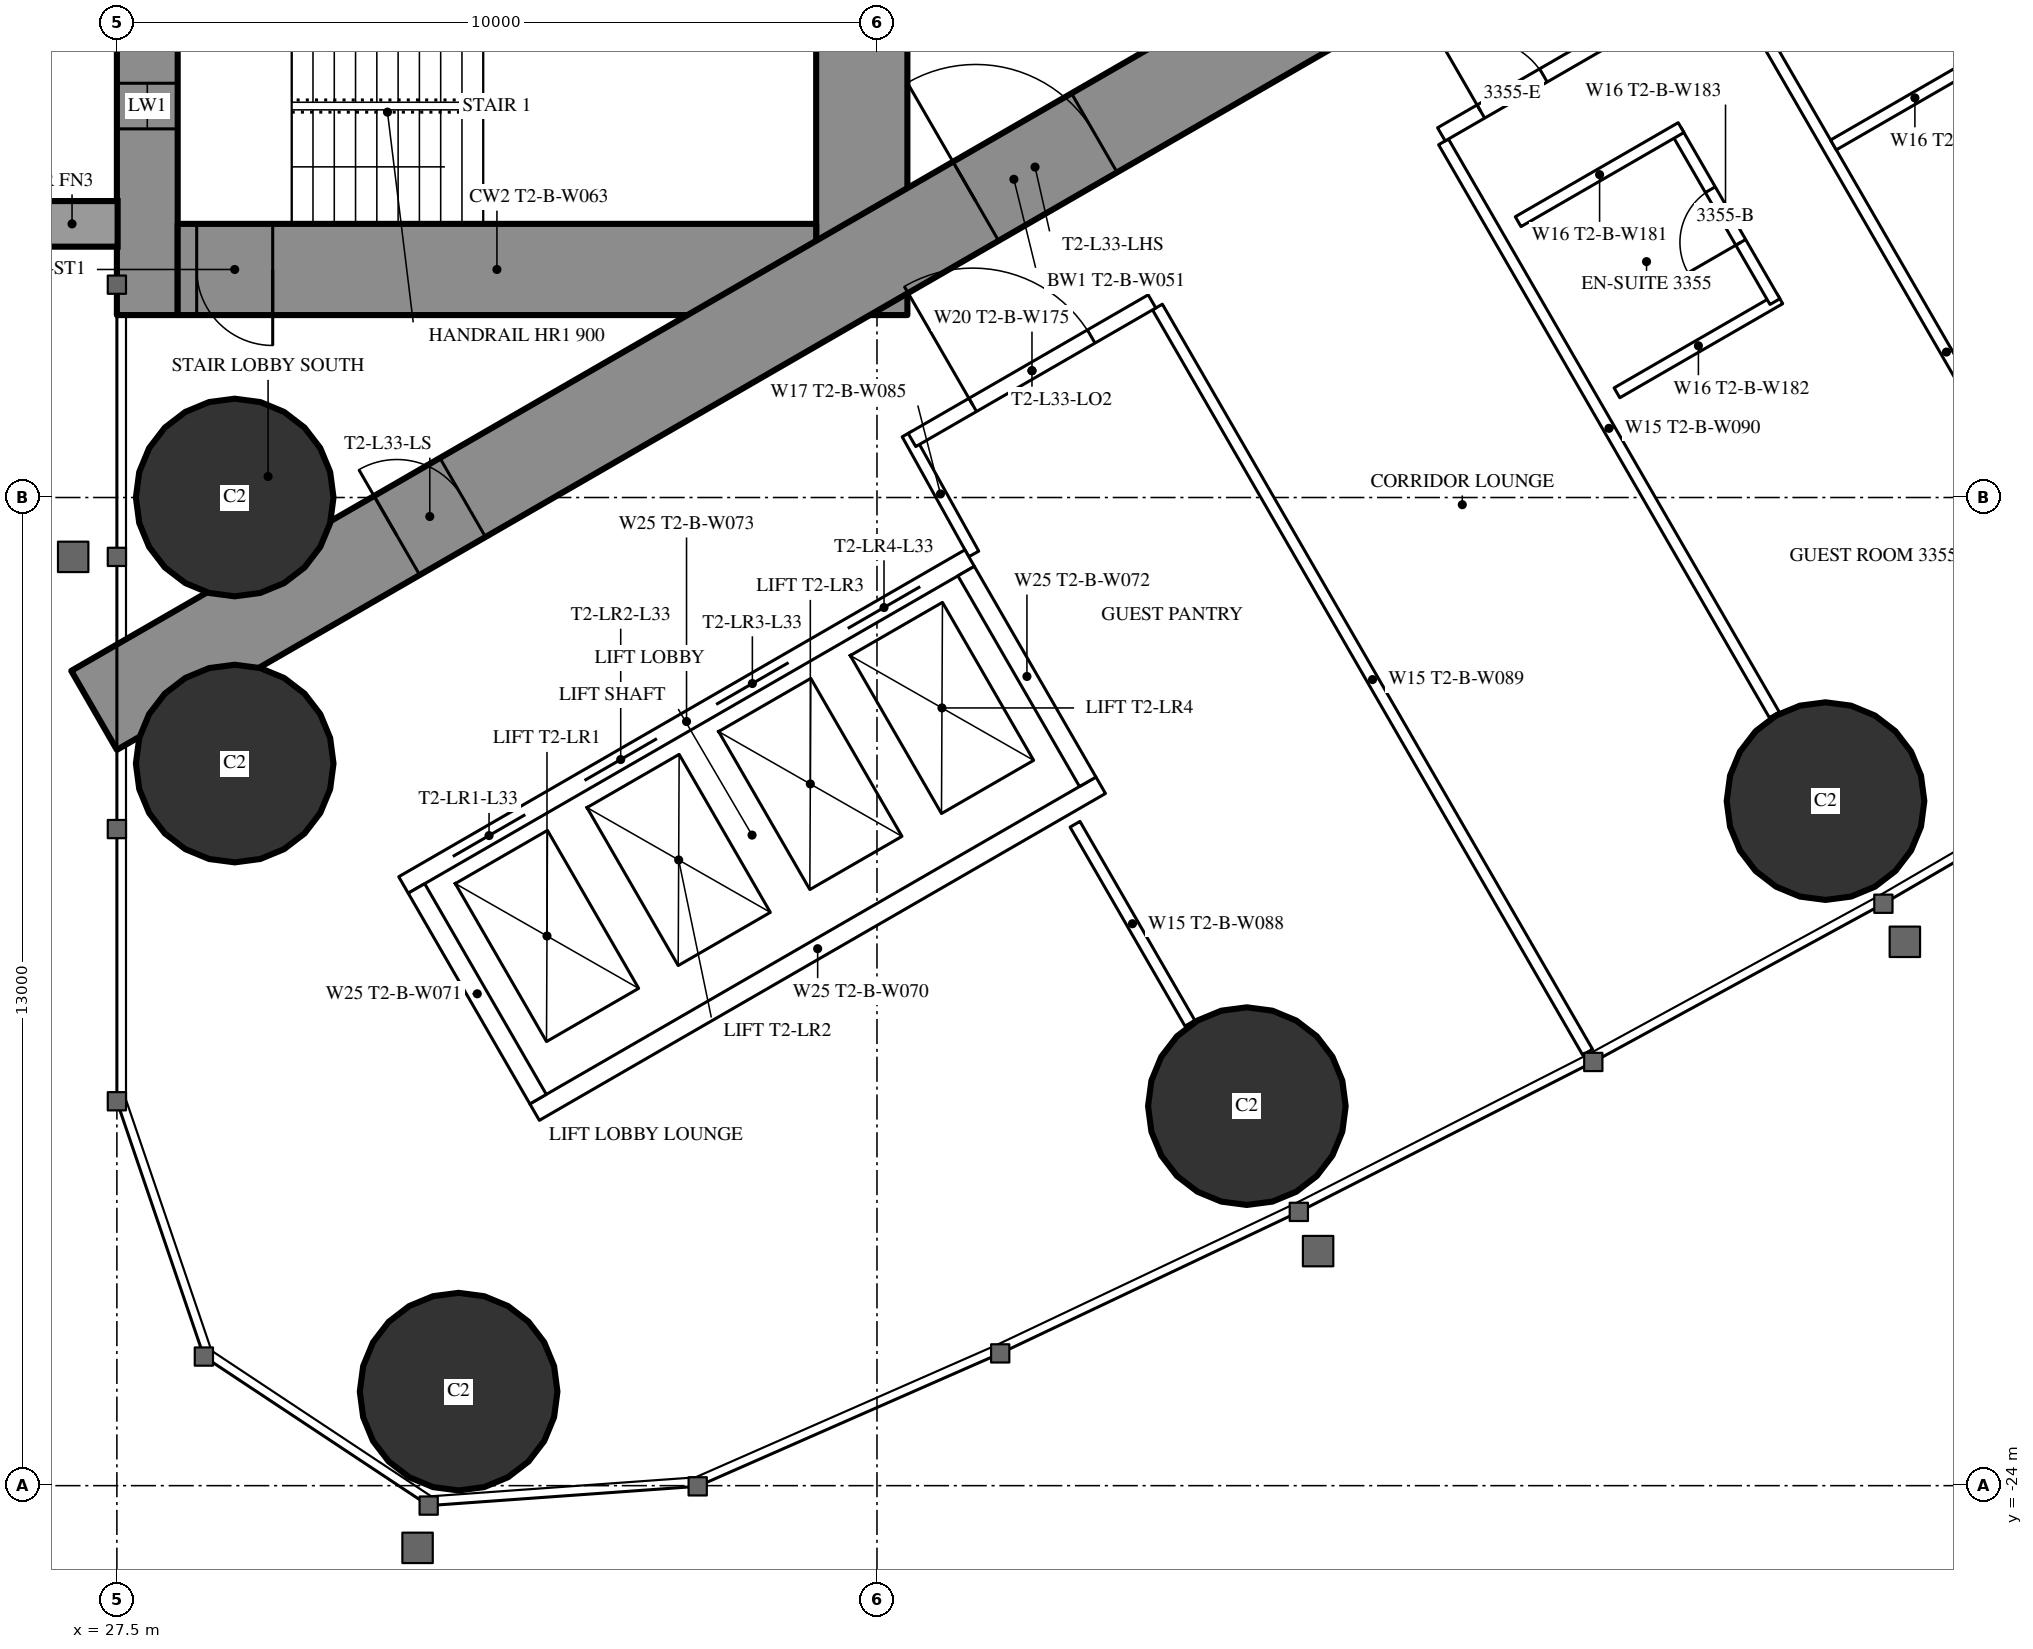
"""IFC4 building model, lengths in metres.
Left out: names, types, materials, properties, quantities, classifications, styles, units other than length and angle.
Written with IfcOpenShell. Run it as: python <this file> out.ifc"""

import sys

from ifc_helpers import new_model, si_unit, direction, frame, frame_2d, origin, origin_2d, place, context, subcontext, project, spatial, rectangle, hollow_circle, extrude, element, fill, save


model = new_model("IFC4")
c1 = context("Model", 3, precision=1e-05, world=origin(), true_north=direction((0.0, 1.0)))
c2 = subcontext(c1, "Body", "Model", "MODEL_VIEW")
j1 = project(units=[si_unit("LENGTHUNIT", "METRE"), si_unit("PLANEANGLEUNIT", "RADIAN")], contexts=[c1])
p1 = place(None, origin())
s1 = spatial("IfcSite", under=j1, at=p1, CompositionType="ELEMENT")
p2 = place(p1, origin())
s2 = spatial("IfcBuilding", under=s1, at=p2, CompositionType="ELEMENT")
p3 = place(p2, frame((0.0, 0.0, 125.6)))
s3 = spatial("IfcBuildingStorey", under=s2, at=p3, CompositionType="ELEMENT", Elevation=125.6)
for number, where, z_axis, x_axis in (
    (1, (31.996, -22.763, 0.0), (0.0, 0.0, 1.0), (1.0, 0.0, 0.0)),
    (2, (29.05, -11.0, 0.0), (0.0, 0.0, 1.0), (1.0, 0.0, 0.0)),
    (3, (29.05, -14.5, 0.0), (0.0, 0.0, 1.0), (1.0, 0.0, 0.0)),
    (4, (42.366, -19.007, 0.0), (0.0, 0.0, 1.0), (1.0, 0.0, 0.0)),
    (5, (49.979, -14.994, 0.0), (0.0, 0.0, 1.0), (1.0, 0.0, 0.0)),
):
    element("IfcColumn", number, at=place(p3, frame(where, z_axis=z_axis, x_axis=x_axis)), inside=s3, PredefinedType="COLUMN", context=c2, shape_type="SweptSolid", body=[
        extrude(hollow_circle(Radius=1.3, WallThickness=0.1, at=origin_2d()), origin(), (0.0, 0.0, 1.0), 3.5),
    ])
p4 = place(p3, frame((27.9, -8.6, 0.0), z_axis=(0.0, 0.0, 1.0), x_axis=(0.0, 1.0, 0.0)))
e6 = element("IfcWall", 6, at=p4, inside=s3, PredefinedType="SHEAR", context=c2, shape_type="SweptSolid", body=[
    extrude(rectangle(XDim=17.2, YDim=0.8, at=frame_2d((8.6, 0.0))), origin(), (0.0, 0.0, 1.0), 3.5),
])
p5 = place(p4, frame((2.45, 0.0, 0.6)))
e7 = element("IfcOpeningElement", 7, at=p5, cuts=e6, PredefinedType="OPENING", context=c2, shape_type="SweptSolid", body=[
    extrude(rectangle(XDim=0.6, YDim=2.1, at=frame_2d((0.3, 1.05))), frame((0.0, 0.41, 0.0), z_axis=(0.0, -1.0, 0.0), x_axis=(1.0, 0.0, 0.0)), (0.0, 0.0, 1.0), 0.82),
])
p6 = place(p4, frame((14.15, 0.0, 0.6)))
e8 = element("IfcOpeningElement", 8, at=p6, cuts=e6, PredefinedType="OPENING", context=c2, shape_type="SweptSolid", body=[
    extrude(rectangle(XDim=0.6, YDim=2.1, at=frame_2d((0.3, 1.05))), frame((0.0, 0.41, 0.0), z_axis=(0.0, -1.0, 0.0), x_axis=(1.0, 0.0, 0.0)), (0.0, 0.0, 1.0), 0.82),
])
p7 = place(p3, frame((37.3, -8.6, 0.0), z_axis=(0.0, 0.0, 1.0), x_axis=(0.0, 1.0, 0.0)))
e9 = element("IfcWall", 9, at=p7, inside=s3, PredefinedType="SHEAR", context=c2, shape_type="SweptSolid", body=[
    extrude(rectangle(XDim=17.2, YDim=1.2, at=frame_2d((8.6, 0.0))), origin(), (0.0, 0.0, 1.0), 3.5),
])
p8 = place(p7, frame((7.7, 0.0, 0.0)))
e10 = element("IfcOpeningElement", 10, at=p8, cuts=e9, PredefinedType="OPENING", context=c2, shape_type="SweptSolid", body=[
    extrude(rectangle(XDim=1.8, YDim=2.2, at=frame_2d((0.9, 1.1))), frame((0.0, 0.61, 0.0), z_axis=(0.0, -1.0, 0.0), x_axis=(1.0, 0.0, 0.0)), (0.0, 0.0, 1.0), 1.22),
])
p9 = place(p3, frame((28.3, -8.0, 0.0), z_axis=(0.0, 0.0, 1.0), x_axis=(1.0, 0.0, 0.0)))
e11 = element("IfcWall", 11, at=p9, inside=s3, PredefinedType="SHEAR", context=c2, shape_type="SweptSolid", body=[
    extrude(rectangle(XDim=8.4, YDim=1.2, at=frame_2d((4.2, 0.0))), origin(), (0.0, 0.0, 1.0), 3.5),
])
p10 = place(p9, frame((0.25, 0.0, 0.0)))
e12 = element("IfcOpeningElement", 12, at=p10, cuts=e11, PredefinedType="OPENING", context=c2, shape_type="SweptSolid", body=[
    extrude(rectangle(XDim=1.0, YDim=2.2, at=frame_2d((0.5, 1.1))), frame((0.0, 0.61, 0.0), z_axis=(0.0, -1.0, 0.0), x_axis=(1.0, 0.0, 0.0)), (0.0, 0.0, 1.0), 1.22),
])
p11 = place(p3, frame((27.2, -13.8, 0.0), z_axis=(0.0, 0.0, 1.0), x_axis=(0.866027159892, 0.499996958321, 0.0)))
e13 = element("IfcWall", 13, at=p11, inside=s3, PredefinedType="SHEAR", context=c2, shape_type="SweptSolid", body=[
    extrude(rectangle(XDim=27.947, YDim=1.2, at=frame_2d((13.973, 0.0))), origin(), (0.0, 0.0, 1.0), 3.5),
])
p12 = place(p11, frame((4.6, 0.0, 0.0)))
e14 = element("IfcOpeningElement", 14, at=p12, cuts=e13, PredefinedType="OPENING", context=c2, shape_type="SweptSolid", body=[
    extrude(rectangle(XDim=1.0, YDim=2.2, at=frame_2d((0.5, 1.1))), frame((0.0, 0.61, 0.0), z_axis=(0.0, -1.0, 0.0), x_axis=(1.0, 0.0, 0.0)), (0.0, 0.0, 1.0), 1.22),
])
p13 = place(p11, frame((13.395, 0.0, 0.0)))
e15 = element("IfcOpeningElement", 15, at=p13, cuts=e13, PredefinedType="OPENING", context=c2, shape_type="SweptSolid", body=[
    extrude(rectangle(XDim=1.8, YDim=2.2, at=frame_2d((0.9, 1.1))), frame((0.0, 0.61, 0.0), z_axis=(0.0, -1.0, 0.0), x_axis=(1.0, 0.0, 0.0)), (0.0, 0.0, 1.0), 1.22),
])
p14 = place(p3, frame((41.19, -8.494, 0.0), z_axis=(0.0, 0.0, 1.0), x_axis=(0.49999258054, -0.866029687369, 0.0)))
e16 = element("IfcWall", 16, at=p14, inside=s3, PredefinedType="PARTITIONING", context=c2, shape_type="SweptSolid", body=[
    extrude(rectangle(XDim=11.318, YDim=0.15, at=frame_2d((5.659, 0.0))), origin(), (0.0, 0.0, 1.0), 3.25),
])
p15 = place(p3, frame((44.954, -6.321, 0.0), z_axis=(0.0, 0.0, 1.0), x_axis=(0.500018676722, -0.866014620505, 0.0)))
e17 = element("IfcWall", 17, at=p15, inside=s3, PredefinedType="PARTITIONING", context=c2, shape_type="SweptSolid", body=[
    extrude(rectangle(XDim=8.704, YDim=0.15, at=frame_2d((4.352, 0.0))), origin(), (0.0, 0.0, 1.0), 2.2),
])
p16 = place(p3, frame((48.719, -4.147, 0.0), z_axis=(0.0, 0.0, 1.0), x_axis=(0.499990498062, -0.866030889661, 0.0)))
e18 = element("IfcWall", 18, at=p16, inside=s3, PredefinedType="PARTITIONING", context=c2, shape_type="SweptSolid", body=[
    extrude(rectangle(XDim=11.406, YDim=0.15, at=frame_2d((5.703, 0.0))), origin(), (0.0, 0.0, 1.0), 3.25),
])
p17 = place(p3, frame((40.105, -15.299, 0.0), z_axis=(0.0, 0.0, 1.0), x_axis=(0.499978822259, -0.866037630414, 0.0)))
e19 = element("IfcWall", 19, at=p17, inside=s3, PredefinedType="PARTITIONING", context=c2, shape_type="SweptSolid", body=[
    extrude(rectangle(XDim=3.023, YDim=0.15, at=frame_2d((1.511, 0.0))), origin(), (0.0, 0.0, 1.0), 3.25),
])
p18 = place(p3, frame((38.773, -11.742, 0.0), z_axis=(0.0, 0.0, 1.0), x_axis=(-0.485528096672, 0.8742210632, 0.0)))
e20 = element("IfcWall", 20, at=p18, inside=s3, PredefinedType="PARTITIONING", context=c2, shape_type="SweptSolid", body=[
    extrude(rectangle(XDim=1.805, YDim=0.15, at=frame_2d((0.903, 0.0))), origin(), (0.0, 0.0, 1.0), 3.25),
])
p19 = place(p3, frame((37.96, -10.243, 0.0), z_axis=(0.0, 0.0, 1.0), x_axis=(0.866042886279, 0.499969718208, 0.0)))
e21 = element("IfcWall", 21, at=p19, inside=s3, PredefinedType="PARTITIONING", context=c2, shape_type="SweptSolid", body=[
    extrude(rectangle(XDim=3.647, YDim=0.2, at=frame_2d((1.823, 0.0))), origin(), (0.0, 0.0, 1.0), 3.25),
])
p20 = place(p19, frame((0.923, 0.0, 0.0)))
e22 = element("IfcOpeningElement", 22, at=p20, cuts=e21, PredefinedType="OPENING", context=c2, shape_type="SweptSolid", body=[
    extrude(rectangle(XDim=1.8, YDim=2.2, at=frame_2d((0.9, 1.1))), frame((0.0, 0.11, 0.0), z_axis=(0.0, -1.0, 0.0), x_axis=(1.0, 0.0, 0.0)), (0.0, 0.0, 1.0), 0.22),
])
p21 = place(p3, frame((44.925, -6.222, 0.0), z_axis=(0.0, 0.0, 1.0), x_axis=(0.866020269055, 0.500008893506, 0.0)))
e23 = element("IfcWall", 23, at=p21, inside=s3, PredefinedType="PARTITIONING", context=c2, shape_type="SweptSolid", body=[
    extrude(rectangle(XDim=12.444, YDim=0.2, at=frame_2d((6.222, 0.0))), origin(), (0.0, 0.0, 1.0), 3.25),
])
p22 = place(p21, frame((0.6, 0.0, 0.0)))
e24 = element("IfcOpeningElement", 24, at=p22, cuts=e23, PredefinedType="OPENING", context=c2, shape_type="SweptSolid", body=[
    extrude(rectangle(XDim=0.95, YDim=2.2, at=frame_2d((0.475, 1.1))), frame((0.0, 0.11, 0.0), z_axis=(0.0, -1.0, 0.0), x_axis=(1.0, 0.0, 0.0)), (0.0, 0.0, 1.0), 0.22),
])
p23 = place(p21, frame((7.047, 0.0, 0.0)))
e25 = element("IfcOpeningElement", 25, at=p23, cuts=e23, PredefinedType="OPENING", context=c2, shape_type="SweptSolid", body=[
    extrude(rectangle(XDim=0.95, YDim=2.2, at=frame_2d((0.475, 1.1))), frame((0.0, 0.11, 0.0), z_axis=(0.0, -1.0, 0.0), x_axis=(1.0, 0.0, 0.0)), (0.0, 0.0, 1.0), 0.22),
])
p24 = place(p3, frame((47.235, -9.623, 0.0), z_axis=(0.0, 0.0, 1.0), x_axis=(0.866006523861, 0.500032699561, 0.0)))
e26 = element("IfcWall", 26, at=p24, inside=s3, PredefinedType="PARTITIONING", context=c2, shape_type="SweptSolid", body=[
    extrude(rectangle(XDim=2.475, YDim=0.15, at=frame_2d((1.237, 0.0))), origin(), (0.0, 0.0, 1.0), 3.25),
])
p25 = place(p3, frame((48.013, -6.171, 0.0), z_axis=(0.0, 0.0, 1.0), x_axis=(0.500006934395, -0.866021400173, 0.0)))
e27 = element("IfcWall", 27, at=p25, inside=s3, PredefinedType="PARTITIONING", context=c2, shape_type="SweptSolid", body=[
    extrude(rectangle(XDim=2.6, YDim=0.15, at=frame_2d((1.3, 0.0))), origin(), (0.0, 0.0, 1.0), 3.25),
])
p26 = place(p25, frame((0.9, 0.0, 0.0)))
e28 = element("IfcOpeningElement", 28, at=p26, cuts=e27, PredefinedType="OPENING", context=c2, shape_type="SweptSolid", body=[
    extrude(rectangle(XDim=0.8, YDim=2.2, at=frame_2d((0.4, 1.1))), frame((0.0, 0.085, 0.0), z_axis=(0.0, -1.0, 0.0), x_axis=(1.0, 0.0, 0.0)), (0.0, 0.0, 1.0), 0.17),
])
p27 = place(p3, frame((45.935, -7.371, 0.0), z_axis=(0.0, 0.0, 1.0), x_axis=(0.866031185235, 0.4999899861, 0.0)))
e29 = element("IfcWall", 29, at=p27, inside=s3, PredefinedType="PARTITIONING", context=c2, shape_type="SweptSolid", body=[
    extrude(rectangle(XDim=2.475, YDim=0.15, at=frame_2d((1.238, 0.0))), origin(), (0.0, 0.0, 1.0), 3.25),
])
p28 = place(p3, frame((50.083, -6.362, 0.0), z_axis=(0.0, 0.0, 1.0), x_axis=(0.866006523861, 0.500032699561, 0.0)))
e30 = element("IfcWall", 30, at=p28, inside=s3, PredefinedType="PARTITIONING", context=c2, shape_type="SweptSolid", body=[
    extrude(rectangle(XDim=2.475, YDim=0.15, at=frame_2d((1.237, 0.0))), origin(), (0.0, 0.0, 1.0), 3.25),
])
p29 = place(p3, frame((50.862, -2.91, 0.0), z_axis=(0.0, 0.0, 1.0), x_axis=(0.500047596559, -0.865997922154, 0.0)))
e31 = element("IfcWall", 31, at=p29, inside=s3, PredefinedType="PARTITIONING", context=c2, shape_type="SweptSolid", body=[
    extrude(rectangle(XDim=2.6, YDim=0.15, at=frame_2d((1.3, 0.0))), origin(), (0.0, 0.0, 1.0), 3.25),
])
p30 = place(p29, frame((0.9, 0.0, 0.0)))
e32 = element("IfcOpeningElement", 32, at=p30, cuts=e31, PredefinedType="OPENING", context=c2, shape_type="SweptSolid", body=[
    extrude(rectangle(XDim=0.8, YDim=2.2, at=frame_2d((0.4, 1.1))), frame((0.0, 0.085, 0.0), z_axis=(0.0, -1.0, 0.0), x_axis=(1.0, 0.0, 0.0)), (0.0, 0.0, 1.0), 0.17),
])
p31 = place(p3, frame((31.271, -16.097, 0.0), z_axis=(0.0, 0.0, 1.0), x_axis=(0.86604045752, 0.499973925258, 0.0)))
e33 = element("IfcWall", 33, at=p31, inside=s3, PredefinedType="PARTITIONING", context=c2, shape_type="SweptSolid", body=[
    extrude(rectangle(XDim=8.6, YDim=0.25, at=frame_2d((4.3, 0.0))), origin(), (0.0, 0.0, 1.0), 3.25),
])
p32 = place(p31, frame((0.75, 0.0, 0.0)))
e34 = element("IfcOpeningElement", 34, at=p32, cuts=e33, PredefinedType="OPENING", context=c2, shape_type="SweptSolid", body=[
    extrude(rectangle(XDim=1.1, YDim=2.2, at=frame_2d((0.55, 1.1))), frame((0.0, 0.135, 0.0), z_axis=(0.0, -1.0, 0.0), x_axis=(1.0, 0.0, 0.0)), (0.0, 0.0, 1.0), 0.27),
])
p33 = place(p31, frame((2.75, 0.0, 0.0)))
e35 = element("IfcOpeningElement", 35, at=p33, cuts=e33, PredefinedType="OPENING", context=c2, shape_type="SweptSolid", body=[
    extrude(rectangle(XDim=1.1, YDim=2.2, at=frame_2d((0.55, 1.1))), frame((0.0, 0.135, 0.0), z_axis=(0.0, -1.0, 0.0), x_axis=(1.0, 0.0, 0.0)), (0.0, 0.0, 1.0), 0.27),
])
p34 = place(p31, frame((4.75, 0.0, 0.0)))
e36 = element("IfcOpeningElement", 36, at=p34, cuts=e33, PredefinedType="OPENING", context=c2, shape_type="SweptSolid", body=[
    extrude(rectangle(XDim=1.1, YDim=2.2, at=frame_2d((0.55, 1.1))), frame((0.0, 0.135, 0.0), z_axis=(0.0, -1.0, 0.0), x_axis=(1.0, 0.0, 0.0)), (0.0, 0.0, 1.0), 0.27),
])
p35 = place(p31, frame((6.75, 0.0, 0.0)))
e37 = element("IfcOpeningElement", 37, at=p35, cuts=e33, PredefinedType="OPENING", context=c2, shape_type="SweptSolid", body=[
    extrude(rectangle(XDim=1.1, YDim=2.2, at=frame_2d((0.55, 1.1))), frame((0.0, 0.135, 0.0), z_axis=(0.0, -1.0, 0.0), x_axis=(1.0, 0.0, 0.0)), (0.0, 0.0, 1.0), 0.27),
])
p36 = place(p3, frame((32.996, -19.086, 0.0), z_axis=(0.0, 0.0, 1.0), x_axis=(0.866028165386, 0.499995216735, 0.0)))
e38 = element("IfcWall", 38, at=p36, inside=s3, PredefinedType="PARTITIONING", context=c2, shape_type="SweptSolid", body=[
    extrude(rectangle(XDim=8.6, YDim=0.25, at=frame_2d((4.3, 0.0))), origin(), (0.0, 0.0, 1.0), 3.25),
])
for number, where, z_axis, x_axis in (
    (39, (31.441, -16.143, 0.0), (0.0, 0.0, 1.0), (0.5, -0.866, 0.0)),
    (40, (38.673, -11.968, 0.0), (0.0, 0.0, 1.0), (0.5, -0.866, 0.0)),
):
    element("IfcWall", number, at=place(p3, frame(where, z_axis=z_axis, x_axis=x_axis)), inside=s3, PredefinedType="PARTITIONING", context=c2, shape_type="SweptSolid", body=[
        extrude(rectangle(XDim=3.201, YDim=0.25, at=frame_2d((1.6, 0.0))), origin(), (0.0, 0.0, 1.0), 3.25),
    ])
p37 = place(p26, origin())
e41 = element("IfcDoor", 41, at=p37, inside=s3, OperationType="SINGLE_SWING_RIGHT", PredefinedType="DOOR", context=c2, shape_type="SweptSolid", body=[
    extrude(rectangle(XDim=0.8, YDim=2.2, at=frame_2d((0.4, 1.1))), frame((0.0, 0.025, 0.0), z_axis=(0.0, -1.0, 0.0), x_axis=(1.0, 0.0, 0.0)), (0.0, 0.0, 1.0), 0.05),
])
fill(e28, e41)
p38 = place(p22, origin())
e42 = element("IfcDoor", 42, at=p38, inside=s3, OperationType="SINGLE_SWING_LEFT", PredefinedType="DOOR", context=c2, shape_type="SweptSolid", body=[
    extrude(rectangle(XDim=0.95, YDim=2.2, at=frame_2d((0.475, 1.1))), frame((0.0, 0.025, 0.0), z_axis=(0.0, -1.0, 0.0), x_axis=(1.0, 0.0, 0.0)), (0.0, 0.0, 1.0), 0.05),
])
fill(e24, e42)
p39 = place(p20, origin())
e43 = element("IfcDoor", 43, at=p39, inside=s3, OperationType="DOUBLE_DOOR_SINGLE_SWING", PredefinedType="DOOR", context=c2, shape_type="SweptSolid", body=[
    extrude(rectangle(XDim=1.8, YDim=2.2, at=frame_2d((0.9, 1.1))), frame((0.0, 0.025, 0.0), z_axis=(0.0, -1.0, 0.0), x_axis=(1.0, 0.0, 0.0)), (0.0, 0.0, 1.0), 0.05),
])
fill(e22, e43)
p40 = place(p12, origin())
e44 = element("IfcDoor", 44, at=p40, inside=s3, OperationType="SINGLE_SWING_LEFT", PredefinedType="DOOR", context=c2, shape_type="SweptSolid", body=[
    extrude(rectangle(XDim=1.0, YDim=2.2, at=frame_2d((0.5, 1.1))), frame((0.0, 0.025, 0.0), z_axis=(0.0, -1.0, 0.0), x_axis=(1.0, 0.0, 0.0)), (0.0, 0.0, 1.0), 0.05),
])
fill(e14, e44)
p41 = place(p13, origin())
e45 = element("IfcDoor", 45, at=p41, inside=s3, OperationType="DOUBLE_DOOR_SINGLE_SWING", PredefinedType="DOOR", context=c2, shape_type="SweptSolid", body=[
    extrude(rectangle(XDim=1.8, YDim=2.2, at=frame_2d((0.9, 1.1))), frame((0.0, 0.025, 0.0), z_axis=(0.0, -1.0, 0.0), x_axis=(1.0, 0.0, 0.0)), (0.0, 0.0, 1.0), 0.05),
])
fill(e15, e45)
p42 = place(p10, origin())
e46 = element("IfcDoor", 46, at=p42, inside=s3, OperationType="SINGLE_SWING_RIGHT", PredefinedType="DOOR", context=c2, shape_type="SweptSolid", body=[
    extrude(rectangle(XDim=1.0, YDim=2.2, at=frame_2d((0.5, 1.1))), frame((0.0, 0.025, 0.0), z_axis=(0.0, -1.0, 0.0), x_axis=(1.0, 0.0, 0.0)), (0.0, 0.0, 1.0), 0.05),
])
fill(e12, e46)
p43 = place(p32, origin())
e47 = element("IfcDoor", 47, at=p43, inside=s3, OperationType="DOUBLE_DOOR_SLIDING", PredefinedType="USERDEFINED", context=c2, shape_type="SweptSolid", body=[
    extrude(rectangle(XDim=1.1, YDim=2.2, at=frame_2d((0.55, 1.1))), frame((0.0, 0.025, 0.0), z_axis=(0.0, -1.0, 0.0), x_axis=(1.0, 0.0, 0.0)), (0.0, 0.0, 1.0), 0.05),
])
fill(e34, e47)
p44 = place(p33, origin())
e48 = element("IfcDoor", 48, at=p44, inside=s3, OperationType="DOUBLE_DOOR_SLIDING", PredefinedType="USERDEFINED", context=c2, shape_type="SweptSolid", body=[
    extrude(rectangle(XDim=1.1, YDim=2.2, at=frame_2d((0.55, 1.1))), frame((0.0, 0.025, 0.0), z_axis=(0.0, -1.0, 0.0), x_axis=(1.0, 0.0, 0.0)), (0.0, 0.0, 1.0), 0.05),
])
fill(e35, e48)
p45 = place(p34, origin())
e49 = element("IfcDoor", 49, at=p45, inside=s3, OperationType="DOUBLE_DOOR_SLIDING", PredefinedType="USERDEFINED", context=c2, shape_type="SweptSolid", body=[
    extrude(rectangle(XDim=1.1, YDim=2.2, at=frame_2d((0.55, 1.1))), frame((0.0, 0.025, 0.0), z_axis=(0.0, -1.0, 0.0), x_axis=(1.0, 0.0, 0.0)), (0.0, 0.0, 1.0), 0.05),
])
fill(e36, e49)
p46 = place(p35, origin())
e50 = element("IfcDoor", 50, at=p46, inside=s3, OperationType="DOUBLE_DOOR_SLIDING", PredefinedType="USERDEFINED", context=c2, shape_type="SweptSolid", body=[
    extrude(rectangle(XDim=1.1, YDim=2.2, at=frame_2d((0.55, 1.1))), frame((0.0, 0.025, 0.0), z_axis=(0.0, -1.0, 0.0), x_axis=(1.0, 0.0, 0.0)), (0.0, 0.0, 1.0), 0.05),
])
fill(e37, e50)
p47 = place(p5, origin())
e51 = element("IfcWindow", 51, at=p47, inside=s3, PartitioningType="SINGLE_PANEL", PredefinedType="WINDOW", context=c2, shape_type="SweptSolid", body=[
    extrude(rectangle(XDim=0.6, YDim=2.1, at=frame_2d((0.3, 1.05))), frame((0.0, 0.03, 0.0), z_axis=(0.0, -1.0, 0.0), x_axis=(1.0, 0.0, 0.0)), (0.0, 0.0, 1.0), 0.06),
])
fill(e7, e51)
save(model, sys.argv[1])
